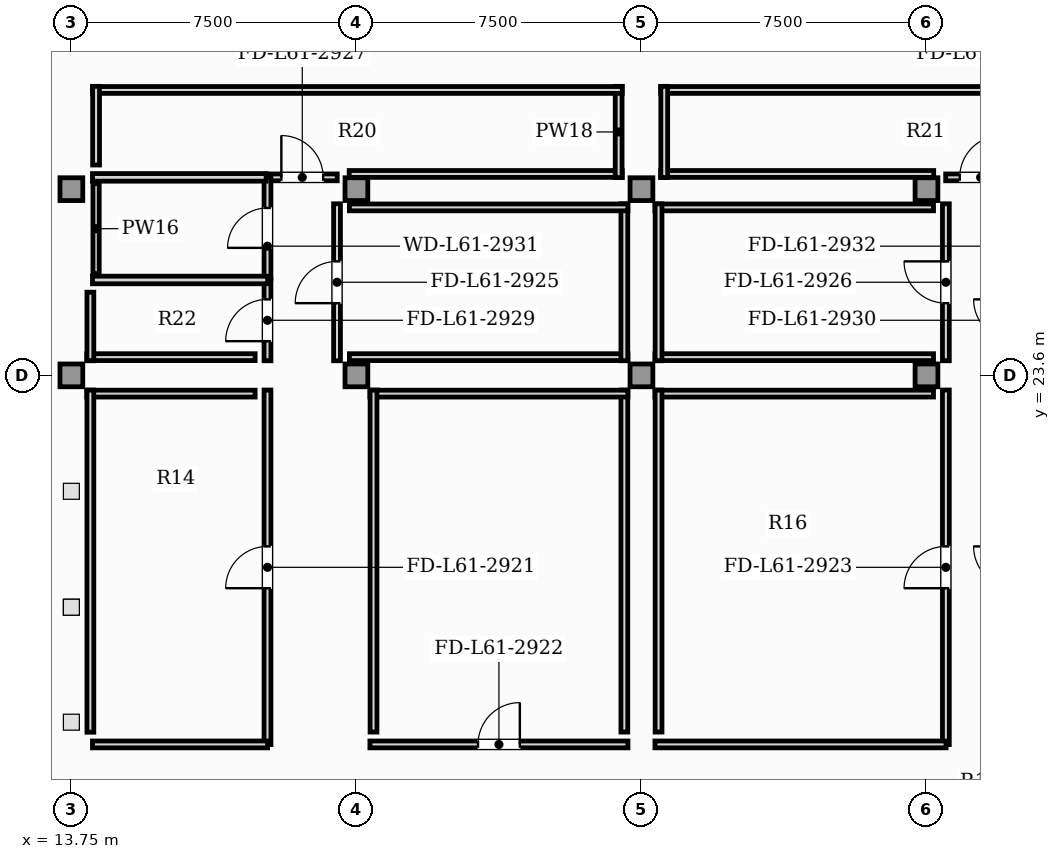
"""IFC4 building model, lengths in metres.
Left out: names, types, materials, properties, quantities, classifications, styles, units other than length and angle.
Written with IfcOpenShell. Run it as: python <this file> out.ifc"""

import sys

from ifc_helpers import new_model, si_unit, direction, frame, frame_2d, origin, origin_2d, place, context, subcontext, project, spatial, rectangle, extrude, element, fill, save


model = new_model("IFC4")
c1 = context("Model", 3, precision=1e-05, world=origin(), true_north=direction((0.0, 1.0)))
c2 = subcontext(c1, "Body", "Model", "MODEL_VIEW")
j1 = project(units=[si_unit("LENGTHUNIT", "METRE"), si_unit("PLANEANGLEUNIT", "RADIAN")], contexts=[c1])
p1 = place(None, origin())
s1 = spatial("IfcSite", under=j1, at=p1, CompositionType="ELEMENT")
p2 = place(p1, origin())
s2 = spatial("IfcBuilding", under=s1, at=p2, CompositionType="ELEMENT")
p3 = place(p2, frame((0.0, 0.0, 246.5)))
s3 = spatial("IfcBuildingStorey", under=s2, at=p3, CompositionType="ELEMENT", Elevation=246.5)
for number, where, z_axis, x_axis in (
    (1, (13.75, 23.6, 0.0), (0.0, 0.0, 1.0), (1.0, 0.0, 0.0)),
    (2, (21.25, 23.6, 0.0), (0.0, 0.0, 1.0), (1.0, 0.0, 0.0)),
    (3, (28.75, 23.6, 0.0), (0.0, 0.0, 1.0), (1.0, 0.0, 0.0)),
    (4, (36.25, 23.6, 0.0), (0.0, 0.0, 1.0), (1.0, 0.0, 0.0)),
    (5, (13.75, 28.5, 0.0), (0.0, 0.0, 1.0), (1.0, 0.0, 0.0)),
    (6, (21.25, 28.5, 0.0), (0.0, 0.0, 1.0), (1.0, 0.0, 0.0)),
    (7, (28.75, 28.5, 0.0), (0.0, 0.0, 1.0), (1.0, 0.0, 0.0)),
    (8, (36.25, 28.5, 0.0), (0.0, 0.0, 1.0), (1.0, 0.0, 0.0)),
):
    element("IfcColumn", number, at=place(p3, frame(where, z_axis=z_axis, x_axis=x_axis)), inside=s3, PredefinedType="COLUMN", context=c2, shape_type="SweptSolid", body=[
        extrude(rectangle(XDim=0.6, YDim=0.6, at=origin_2d()), origin(), (0.0, 0.0, 1.0), 5.2),
    ])
p4 = place(p3, frame((18.91, 13.885, 0.0), z_axis=(0.0, 0.0, 1.0), x_axis=(0.0, 1.0, 0.0)))
e9 = element("IfcWall", 9, at=p4, inside=s3, PredefinedType="PARTITIONING", context=c2, shape_type="SweptSolid", body=[
    extrude(rectangle(XDim=9.33, YDim=0.18, at=frame_2d((4.665, 0.0))), origin(), (0.0, 0.0, 1.0), 4.92),
])
p5 = place(p4, frame((4.115, 0.0, 0.0)))
e10 = element("IfcOpeningElement", 10, at=p5, cuts=e9, PredefinedType="OPENING", context=c2, shape_type="SweptSolid", body=[
    extrude(rectangle(XDim=1.1, YDim=2.2, at=frame_2d((0.55, 1.1))), frame((0.0, 0.1, 0.0), z_axis=(0.0, -1.0, 0.0), x_axis=(1.0, 0.0, 0.0)), (0.0, 0.0, 1.0), 0.2),
])
p6 = place(p3, frame((14.305, 13.89, 0.0), z_axis=(0.0, 0.0, 1.0), x_axis=(1.0, 0.0, 0.0)))
e11 = element("IfcWall", 11, at=p6, inside=s3, PredefinedType="PARTITIONING", context=c2, shape_type="SweptSolid", body=[
    extrude(rectangle(XDim=4.61, YDim=0.18, at=frame_2d((2.305, 0.0))), origin(), (0.0, 0.0, 1.0), 4.92),
])
p7 = place(p3, frame((21.605, 13.89, 0.0), z_axis=(0.0, 0.0, 1.0), x_axis=(1.0, 0.0, 0.0)))
e12 = element("IfcWall", 12, at=p7, inside=s3, PredefinedType="PARTITIONING", context=c2, shape_type="SweptSolid", body=[
    extrude(rectangle(XDim=6.79, YDim=0.18, at=frame_2d((3.395, 0.0))), origin(), (0.0, 0.0, 1.0), 4.92),
])
p8 = place(p7, frame((2.845, 0.0, 0.0)))
e13 = element("IfcOpeningElement", 13, at=p8, cuts=e12, PredefinedType="OPENING", context=c2, shape_type="SweptSolid", body=[
    extrude(rectangle(XDim=1.1, YDim=2.2, at=frame_2d((0.55, 1.1))), frame((0.0, 0.1, 0.0), z_axis=(0.0, -1.0, 0.0), x_axis=(1.0, 0.0, 0.0)), (0.0, 0.0, 1.0), 0.2),
])
p9 = place(p3, frame((36.76, 13.885, 0.0), z_axis=(0.0, 0.0, 1.0), x_axis=(0.0, 1.0, 0.0)))
e14 = element("IfcWall", 14, at=p9, inside=s3, PredefinedType="PARTITIONING", context=c2, shape_type="SweptSolid", body=[
    extrude(rectangle(XDim=9.33, YDim=0.18, at=frame_2d((4.665, 0.0))), origin(), (0.0, 0.0, 1.0), 4.92),
])
p10 = place(p9, frame((4.115, 0.0, 0.0)))
e15 = element("IfcOpeningElement", 15, at=p10, cuts=e14, PredefinedType="OPENING", context=c2, shape_type="SweptSolid", body=[
    extrude(rectangle(XDim=1.1, YDim=2.2, at=frame_2d((0.55, 1.1))), frame((0.0, 0.1, 0.0), z_axis=(0.0, -1.0, 0.0), x_axis=(1.0, 0.0, 0.0)), (0.0, 0.0, 1.0), 0.2),
])
p11 = place(p3, frame((29.105, 13.89, 0.0), z_axis=(0.0, 0.0, 1.0), x_axis=(1.0, 0.0, 0.0)))
e16 = element("IfcWall", 16, at=p11, inside=s3, PredefinedType="PARTITIONING", context=c2, shape_type="SweptSolid", body=[
    extrude(rectangle(XDim=7.66, YDim=0.18, at=frame_2d((3.83, 0.0))), origin(), (0.0, 0.0, 1.0), 4.92),
])
p12 = place(p3, frame((20.74, 23.985, 0.0), z_axis=(0.0, 0.0, 1.0), x_axis=(0.0, 1.0, 0.0)))
e17 = element("IfcWall", 17, at=p12, inside=s3, PredefinedType="PARTITIONING", context=c2, shape_type="SweptSolid", body=[
    extrude(rectangle(XDim=4.13, YDim=0.18, at=frame_2d((2.065, 0.0))), origin(), (0.0, 0.0, 1.0), 4.92),
])
p13 = place(p12, frame((1.515, 0.0, 0.0)))
e18 = element("IfcOpeningElement", 18, at=p13, cuts=e17, PredefinedType="OPENING", context=c2, shape_type="SweptSolid", body=[
    extrude(rectangle(XDim=1.1, YDim=2.2, at=frame_2d((0.55, 1.1))), frame((0.0, 0.1, 0.0), z_axis=(0.0, -1.0, 0.0), x_axis=(1.0, 0.0, 0.0)), (0.0, 0.0, 1.0), 0.2),
])
p14 = place(p3, frame((36.76, 23.985, 0.0), z_axis=(0.0, 0.0, 1.0), x_axis=(0.0, 1.0, 0.0)))
e19 = element("IfcWall", 19, at=p14, inside=s3, PredefinedType="PARTITIONING", context=c2, shape_type="SweptSolid", body=[
    extrude(rectangle(XDim=4.13, YDim=0.18, at=frame_2d((2.065, 0.0))), origin(), (0.0, 0.0, 1.0), 4.92),
])
p15 = place(p14, frame((1.515, 0.0, 0.0)))
e20 = element("IfcOpeningElement", 20, at=p15, cuts=e19, PredefinedType="OPENING", context=c2, shape_type="SweptSolid", body=[
    extrude(rectangle(XDim=1.1, YDim=2.2, at=frame_2d((0.55, 1.1))), frame((0.0, 0.1, 0.0), z_axis=(0.0, -1.0, 0.0), x_axis=(1.0, 0.0, 0.0)), (0.0, 0.0, 1.0), 0.2),
])
p16 = place(p3, frame((18.905, 28.81, 0.0), z_axis=(0.0, 0.0, 1.0), x_axis=(1.0, 0.0, 0.0)))
e21 = element("IfcWall", 21, at=p16, inside=s3, PredefinedType="PARTITIONING", context=c2, shape_type="SweptSolid", body=[
    extrude(rectangle(XDim=1.84, YDim=0.18, at=frame_2d((0.92, 0.0))), origin(), (0.0, 0.0, 1.0), 4.92),
])
p17 = place(p16, frame((0.37, 0.0, 0.0)))
e22 = element("IfcOpeningElement", 22, at=p17, cuts=e21, PredefinedType="OPENING", context=c2, shape_type="SweptSolid", body=[
    extrude(rectangle(XDim=1.1, YDim=2.2, at=frame_2d((0.55, 1.1))), frame((0.0, 0.1, 0.0), z_axis=(0.0, -1.0, 0.0), x_axis=(1.0, 0.0, 0.0)), (0.0, 0.0, 1.0), 0.2),
])
p18 = place(p3, frame((36.755, 28.81, 0.0), z_axis=(0.0, 0.0, 1.0), x_axis=(1.0, 0.0, 0.0)))
e23 = element("IfcWall", 23, at=p18, inside=s3, PredefinedType="PARTITIONING", context=c2, shape_type="SweptSolid", body=[
    extrude(rectangle(XDim=1.84, YDim=0.18, at=frame_2d((0.92, 0.0))), origin(), (0.0, 0.0, 1.0), 4.92),
])
p19 = place(p18, frame((0.37, 0.0, 0.0)))
e24 = element("IfcOpeningElement", 24, at=p19, cuts=e23, PredefinedType="OPENING", context=c2, shape_type="SweptSolid", body=[
    extrude(rectangle(XDim=1.1, YDim=2.2, at=frame_2d((0.55, 1.1))), frame((0.0, 0.1, 0.0), z_axis=(0.0, -1.0, 0.0), x_axis=(1.0, 0.0, 0.0)), (0.0, 0.0, 1.0), 0.2),
])
p20 = place(p3, frame((18.91, 23.985, 0.0), z_axis=(0.0, 0.0, 1.0), x_axis=(0.0, 1.0, 0.0)))
e25 = element("IfcWall", 25, at=p20, inside=s3, PredefinedType="PARTITIONING", context=c2, shape_type="SweptSolid", body=[
    extrude(rectangle(XDim=2.13, YDim=0.18, at=frame_2d((1.065, 0.0))), origin(), (0.0, 0.0, 1.0), 4.92),
])
p21 = place(p20, frame((0.515, 0.0, 0.0)))
e26 = element("IfcOpeningElement", 26, at=p21, cuts=e25, PredefinedType="OPENING", context=c2, shape_type="SweptSolid", body=[
    extrude(rectangle(XDim=1.1, YDim=2.2, at=frame_2d((0.55, 1.1))), frame((0.0, 0.1, 0.0), z_axis=(0.0, -1.0, 0.0), x_axis=(1.0, 0.0, 0.0)), (0.0, 0.0, 1.0), 0.2),
])
p22 = place(p3, frame((18.91, 26.145, 0.0), z_axis=(0.0, 0.0, 1.0), x_axis=(0.0, 1.0, 0.0)))
e27 = element("IfcWall", 27, at=p22, inside=s3, PredefinedType="PARTITIONING", context=c2, shape_type="SweptSolid", body=[
    extrude(rectangle(XDim=2.67, YDim=0.18, at=frame_2d((1.335, 0.0))), origin(), (0.0, 0.0, 1.0), 4.92),
])
p23 = place(p22, frame((0.81, 0.0, 0.0)))
e28 = element("IfcOpeningElement", 28, at=p23, cuts=e27, PredefinedType="OPENING", context=c2, shape_type="SweptSolid", body=[
    extrude(rectangle(XDim=1.05, YDim=2.15, at=frame_2d((0.525, 1.075))), frame((0.0, 0.1, 0.0), z_axis=(0.0, -1.0, 0.0), x_axis=(1.0, 0.0, 0.0)), (0.0, 0.0, 1.0), 0.2),
])
p24 = place(p3, frame((14.305, 28.81, 0.0), z_axis=(0.0, 0.0, 1.0), x_axis=(1.0, 0.0, 0.0)))
e29 = element("IfcWall", 29, at=p24, inside=s3, PredefinedType="PARTITIONING", context=c2, shape_type="SweptSolid", body=[
    extrude(rectangle(XDim=4.57, YDim=0.2, at=frame_2d((2.285, 0.0))), origin(), (0.0, 0.0, 1.0), 4.92),
])
p25 = place(p3, frame((14.305, 26.11, 0.0), z_axis=(0.0, 0.0, 1.0), x_axis=(1.0, 0.0, 0.0)))
e30 = element("IfcWall", 30, at=p25, inside=s3, PredefinedType="PARTITIONING", context=c2, shape_type="SweptSolid", body=[
    extrude(rectangle(XDim=4.61, YDim=0.2, at=frame_2d((2.305, 0.0))), origin(), (0.0, 0.0, 1.0), 4.92),
])
p26 = place(p3, frame((18.585, 23.12, 0.0), z_axis=(0.0, 0.0, 1.0), x_axis=(-1.0, 0.0, 0.0)))
e31 = element("IfcWall", 31, at=p26, inside=s3, PredefinedType="PARTITIONING", context=c2, shape_type="SweptSolid", body=[
    extrude(rectangle(XDim=4.43, YDim=0.18, at=frame_2d((2.215, 0.0))), origin(), (0.0, 0.0, 1.0), 4.92),
])
p27 = place(p3, frame((14.25, 23.215, 0.0), z_axis=(0.0, 0.0, 1.0), x_axis=(0.0, -1.0, 0.0)))
e32 = element("IfcWall", 32, at=p27, inside=s3, PredefinedType="PARTITIONING", context=c2, shape_type="SweptSolid", body=[
    extrude(rectangle(XDim=9.004, YDim=0.18, at=frame_2d((4.502, 0.0))), origin(), (0.0, 0.0, 1.0), 4.92),
])
p28 = place(p3, frame((28.3, 14.215, 0.0), z_axis=(0.0, 0.0, 1.0), x_axis=(0.0, 1.0, 0.0)))
e33 = element("IfcWall", 33, at=p28, inside=s3, PredefinedType="PARTITIONING", context=c2, shape_type="SweptSolid", body=[
    extrude(rectangle(XDim=9.0, YDim=0.18, at=frame_2d((4.5, 0.0))), origin(), (0.0, 0.0, 1.0), 4.92),
])
p29 = place(p3, frame((28.395, 23.12, 0.0), z_axis=(0.0, 0.0, 1.0), x_axis=(-1.0, 0.0, 0.0)))
e34 = element("IfcWall", 34, at=p29, inside=s3, PredefinedType="PARTITIONING", context=c2, shape_type="SweptSolid", body=[
    extrude(rectangle(XDim=6.79, YDim=0.18, at=frame_2d((3.395, 0.0))), origin(), (0.0, 0.0, 1.0), 4.92),
])
p30 = place(p3, frame((21.7, 23.215, 0.0), z_axis=(0.0, 0.0, 1.0), x_axis=(0.0, -1.0, 0.0)))
e35 = element("IfcWall", 35, at=p30, inside=s3, PredefinedType="PARTITIONING", context=c2, shape_type="SweptSolid", body=[
    extrude(rectangle(XDim=9.0, YDim=0.18, at=frame_2d((4.5, 0.0))), origin(), (0.0, 0.0, 1.0), 4.92),
])
p31 = place(p3, frame((36.435, 23.12, 0.0), z_axis=(0.0, 0.0, 1.0), x_axis=(-1.0, 0.0, 0.0)))
e36 = element("IfcWall", 36, at=p31, inside=s3, PredefinedType="PARTITIONING", context=c2, shape_type="SweptSolid", body=[
    extrude(rectangle(XDim=7.33, YDim=0.18, at=frame_2d((3.665, 0.0))), origin(), (0.0, 0.0, 1.0), 4.92),
])
p32 = place(p3, frame((29.2, 23.215, 0.0), z_axis=(0.0, 0.0, 1.0), x_axis=(0.0, -1.0, 0.0)))
e37 = element("IfcWall", 37, at=p32, inside=s3, PredefinedType="PARTITIONING", context=c2, shape_type="SweptSolid", body=[
    extrude(rectangle(XDim=9.0, YDim=0.18, at=frame_2d((4.5, 0.0))), origin(), (0.0, 0.0, 1.0), 4.92),
])
p33 = place(p3, frame((21.065, 24.08, 0.0), z_axis=(0.0, 0.0, 1.0), x_axis=(1.0, 0.0, 0.0)))
e38 = element("IfcWall", 38, at=p33, inside=s3, PredefinedType="PARTITIONING", context=c2, shape_type="SweptSolid", body=[
    extrude(rectangle(XDim=7.33, YDim=0.18, at=frame_2d((3.665, 0.0))), origin(), (0.0, 0.0, 1.0), 4.92),
])
p34 = place(p3, frame((28.3, 23.985, 0.0), z_axis=(0.0, 0.0, 1.0), x_axis=(0.0, 1.0, 0.0)))
e39 = element("IfcWall", 39, at=p34, inside=s3, PredefinedType="PARTITIONING", context=c2, shape_type="SweptSolid", body=[
    extrude(rectangle(XDim=4.13, YDim=0.18, at=frame_2d((2.065, 0.0))), origin(), (0.0, 0.0, 1.0), 4.92),
])
for number, where, z_axis, x_axis in (
    (40, (28.395, 28.02, 0.0), (0.0, 0.0, 1.0), (-1.0, 0.0, 0.0)),
    (41, (29.105, 24.08, 0.0), (0.0, 0.0, 1.0), (1.0, 0.0, 0.0)),
    (42, (36.435, 28.02, 0.0), (0.0, 0.0, 1.0), (-1.0, 0.0, 0.0)),
):
    element("IfcWall", number, at=place(p3, frame(where, z_axis=z_axis, x_axis=x_axis)), inside=s3, PredefinedType="PARTITIONING", context=c2, shape_type="SweptSolid", body=[
        extrude(rectangle(XDim=7.33, YDim=0.18, at=frame_2d((3.665, 0.0))), origin(), (0.0, 0.0, 1.0), 4.92),
    ])
p35 = place(p3, frame((29.2, 28.115, 0.0), z_axis=(0.0, 0.0, 1.0), x_axis=(0.0, -1.0, 0.0)))
e43 = element("IfcWall", 43, at=p35, inside=s3, PredefinedType="PARTITIONING", context=c2, shape_type="SweptSolid", body=[
    extrude(rectangle(XDim=4.13, YDim=0.18, at=frame_2d((2.065, 0.0))), origin(), (0.0, 0.0, 1.0), 4.92),
])
p36 = place(p3, frame((21.06, 28.9, 0.0), z_axis=(0.0, 0.0, 1.0), x_axis=(1.0, 0.0, 0.0)))
e44 = element("IfcWall", 44, at=p36, inside=s3, PredefinedType="PARTITIONING", context=c2, shape_type="SweptSolid", body=[
    extrude(rectangle(XDim=7.185, YDim=0.18, at=frame_2d((3.593, 0.0))), origin(), (0.0, 0.0, 1.0), 4.92),
])
p37 = place(p3, frame((28.15, 28.805, 0.0), z_axis=(0.0, 0.0, 1.0), x_axis=(0.0, 1.0, 0.0)))
e45 = element("IfcWall", 45, at=p37, inside=s3, PredefinedType="PARTITIONING", context=c2, shape_type="SweptSolid", body=[
    extrude(rectangle(XDim=2.4, YDim=0.18, at=frame_2d((1.2, 0.0))), origin(), (0.0, 0.0, 1.0), 4.92),
])
p38 = place(p3, frame((28.245, 31.11, 0.0), z_axis=(0.0, 0.0, 1.0), x_axis=(-1.0, 0.0, 0.0)))
e46 = element("IfcWall", 46, at=p38, inside=s3, PredefinedType="PARTITIONING", context=c2, shape_type="SweptSolid", body=[
    extrude(rectangle(XDim=13.94, YDim=0.18, at=frame_2d((6.97, 0.0))), origin(), (0.0, 0.0, 1.0), 4.92),
])
p39 = place(p3, frame((14.4, 31.205, 0.0), z_axis=(0.0, 0.0, 1.0), x_axis=(0.0, -1.0, 0.0)))
e47 = element("IfcWall", 47, at=p39, inside=s3, PredefinedType="PARTITIONING", context=c2, shape_type="SweptSolid", body=[
    extrude(rectangle(XDim=2.07, YDim=0.18, at=frame_2d((1.035, 0.0))), origin(), (0.0, 0.0, 1.0), 4.92),
])
p40 = place(p3, frame((29.255, 28.9, 0.0), z_axis=(0.0, 0.0, 1.0), x_axis=(1.0, 0.0, 0.0)))
e48 = element("IfcWall", 48, at=p40, inside=s3, PredefinedType="PARTITIONING", context=c2, shape_type="SweptSolid", body=[
    extrude(rectangle(XDim=7.185, YDim=0.18, at=frame_2d((3.593, 0.0))), origin(), (0.0, 0.0, 1.0), 4.92),
])
p41 = place(p3, frame((43.195, 31.11, 0.0), z_axis=(0.0, 0.0, 1.0), x_axis=(-1.0, 0.0, 0.0)))
e49 = element("IfcWall", 49, at=p41, inside=s3, PredefinedType="PARTITIONING", context=c2, shape_type="SweptSolid", body=[
    extrude(rectangle(XDim=13.94, YDim=0.18, at=frame_2d((6.97, 0.0))), origin(), (0.0, 0.0, 1.0), 4.92),
])
p42 = place(p3, frame((29.35, 31.205, 0.0), z_axis=(0.0, 0.0, 1.0), x_axis=(0.0, -1.0, 0.0)))
e50 = element("IfcWall", 50, at=p42, inside=s3, PredefinedType="PARTITIONING", context=c2, shape_type="SweptSolid", body=[
    extrude(rectangle(XDim=2.4, YDim=0.18, at=frame_2d((1.2, 0.0))), origin(), (0.0, 0.0, 1.0), 4.92),
])
p43 = place(p3, frame((14.155, 24.08, 0.0), z_axis=(0.0, 0.0, 1.0), x_axis=(1.0, 0.0, 0.0)))
e51 = element("IfcWall", 51, at=p43, inside=s3, PredefinedType="PARTITIONING", context=c2, shape_type="SweptSolid", body=[
    extrude(rectangle(XDim=4.43, YDim=0.18, at=frame_2d((2.215, 0.0))), origin(), (0.0, 0.0, 1.0), 4.92),
])
p44 = place(p3, frame((14.25, 25.789, 0.0), z_axis=(0.0, 0.0, 1.0), x_axis=(0.0, -1.0, 0.0)))
e52 = element("IfcWall", 52, at=p44, inside=s3, PredefinedType="PARTITIONING", context=c2, shape_type="SweptSolid", body=[
    extrude(rectangle(XDim=1.804, YDim=0.18, at=frame_2d((0.902, 0.0))), origin(), (0.0, 0.0, 1.0), 4.92),
])
p45 = place(p3, frame((14.4, 28.645, 0.0), z_axis=(0.0, 0.0, 1.0), x_axis=(0.0, -1.0, 0.0)))
e53 = element("IfcWall", 53, at=p45, inside=s3, PredefinedType="PLUMBINGWALL", context=c2, shape_type="SweptSolid", body=[
    extrude(rectangle(XDim=2.37, YDim=0.165, at=frame_2d((1.185, 0.0))), origin(), (0.0, 0.0, 1.0), 4.92),
])
p46 = place(p5, origin())
e54 = element("IfcDoor", 54, at=p46, inside=s3, OperationType="SINGLE_SWING_LEFT", PredefinedType="DOOR", context=c2, shape_type="SweptSolid", body=[
    extrude(rectangle(XDim=1.1, YDim=2.2, at=frame_2d((0.55, 1.1))), frame((0.0, 0.025, 0.0), z_axis=(0.0, -1.0, 0.0), x_axis=(1.0, 0.0, 0.0)), (0.0, 0.0, 1.0), 0.05),
])
fill(e10, e54)
p47 = place(p8, origin())
e55 = element("IfcDoor", 55, at=p47, inside=s3, OperationType="SINGLE_SWING_RIGHT", PredefinedType="DOOR", context=c2, shape_type="SweptSolid", body=[
    extrude(rectangle(XDim=1.1, YDim=2.2, at=frame_2d((0.55, 1.1))), frame((0.0, 0.025, 0.0), z_axis=(0.0, -1.0, 0.0), x_axis=(1.0, 0.0, 0.0)), (0.0, 0.0, 1.0), 0.05),
])
fill(e13, e55)
p48 = place(p10, origin())
e56 = element("IfcDoor", 56, at=p48, inside=s3, OperationType="SINGLE_SWING_LEFT", PredefinedType="DOOR", context=c2, shape_type="SweptSolid", body=[
    extrude(rectangle(XDim=1.1, YDim=2.2, at=frame_2d((0.55, 1.1))), frame((0.0, 0.025, 0.0), z_axis=(0.0, -1.0, 0.0), x_axis=(1.0, 0.0, 0.0)), (0.0, 0.0, 1.0), 0.05),
])
fill(e15, e56)
p49 = place(p13, origin())
e57 = element("IfcDoor", 57, at=p49, inside=s3, OperationType="SINGLE_SWING_LEFT", PredefinedType="DOOR", context=c2, shape_type="SweptSolid", body=[
    extrude(rectangle(XDim=1.1, YDim=2.2, at=frame_2d((0.55, 1.1))), frame((0.0, 0.025, 0.0), z_axis=(0.0, -1.0, 0.0), x_axis=(1.0, 0.0, 0.0)), (0.0, 0.0, 1.0), 0.05),
])
fill(e18, e57)
p50 = place(p15, origin())
e58 = element("IfcDoor", 58, at=p50, inside=s3, OperationType="SINGLE_SWING_RIGHT", PredefinedType="DOOR", context=c2, shape_type="SweptSolid", body=[
    extrude(rectangle(XDim=1.1, YDim=2.2, at=frame_2d((0.55, 1.1))), frame((0.0, 0.025, 0.0), z_axis=(0.0, -1.0, 0.0), x_axis=(1.0, 0.0, 0.0)), (0.0, 0.0, 1.0), 0.05),
])
fill(e20, e58)
p51 = place(p17, origin())
e59 = element("IfcDoor", 59, at=p51, inside=s3, OperationType="SINGLE_SWING_LEFT", PredefinedType="DOOR", context=c2, shape_type="SweptSolid", body=[
    extrude(rectangle(XDim=1.1, YDim=2.2, at=frame_2d((0.55, 1.1))), frame((0.0, 0.025, 0.0), z_axis=(0.0, -1.0, 0.0), x_axis=(1.0, 0.0, 0.0)), (0.0, 0.0, 1.0), 0.05),
])
fill(e22, e59)
p52 = place(p19, origin())
e60 = element("IfcDoor", 60, at=p52, inside=s3, OperationType="SINGLE_SWING_RIGHT", PredefinedType="DOOR", context=c2, shape_type="SweptSolid", body=[
    extrude(rectangle(XDim=1.1, YDim=2.2, at=frame_2d((0.55, 1.1))), frame((0.0, 0.025, 0.0), z_axis=(0.0, -1.0, 0.0), x_axis=(1.0, 0.0, 0.0)), (0.0, 0.0, 1.0), 0.05),
])
fill(e24, e60)
p53 = place(p21, origin())
e61 = element("IfcDoor", 61, at=p53, inside=s3, OperationType="SINGLE_SWING_LEFT", PredefinedType="DOOR", context=c2, shape_type="SweptSolid", body=[
    extrude(rectangle(XDim=1.1, YDim=2.2, at=frame_2d((0.55, 1.1))), frame((0.0, 0.025, 0.0), z_axis=(0.0, -1.0, 0.0), x_axis=(1.0, 0.0, 0.0)), (0.0, 0.0, 1.0), 0.05),
])
fill(e26, e61)
p54 = place(p23, origin())
e62 = element("IfcDoor", 62, at=p54, inside=s3, OperationType="SINGLE_SWING_LEFT", PredefinedType="DOOR", context=c2, shape_type="SweptSolid", body=[
    extrude(rectangle(XDim=1.05, YDim=2.15, at=frame_2d((0.525, 1.075))), frame((0.0, 0.025, 0.0), z_axis=(0.0, -1.0, 0.0), x_axis=(1.0, 0.0, 0.0)), (0.0, 0.0, 1.0), 0.05),
])
fill(e28, e62)
save(model, sys.argv[1])
